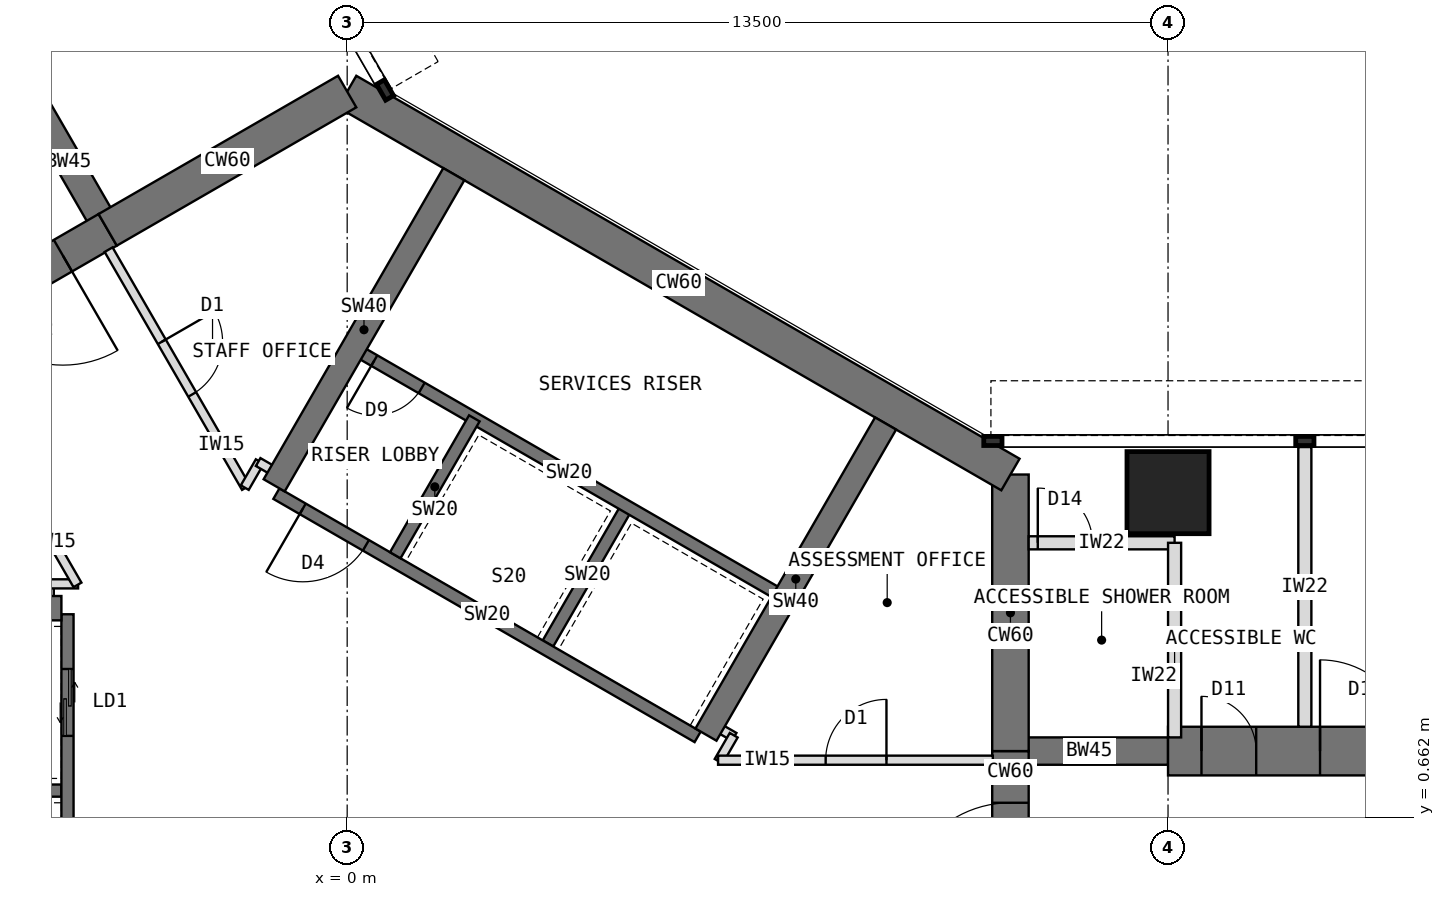
"""IFC4 building model, lengths in metres.
Left out: names, types, materials, properties, quantities, classifications, styles, units other than length and angle.
Written with IfcOpenShell. Run it as: python <this file> out.ifc"""

import sys

from ifc_helpers import new_model, si_unit, direction, frame, frame_2d, origin, origin_2d, place, context, subcontext, project, spatial, rectangle, extrude, element, fill, save


model = new_model("IFC4")
c1 = context("Model", 3, precision=1e-05, world=origin(), true_north=direction((0.0, 1.0)))
c2 = subcontext(c1, "Body", "Model", "MODEL_VIEW")
j1 = project(units=[si_unit("LENGTHUNIT", "METRE"), si_unit("PLANEANGLEUNIT", "RADIAN")], contexts=[c1])
p1 = place(None, origin())
s1 = spatial("IfcSite", under=j1, at=p1, CompositionType="ELEMENT")
p2 = place(p1, origin())
s2 = spatial("IfcBuilding", under=s1, at=p2, CompositionType="ELEMENT")
p3 = place(p2, frame((0.0, 0.0, 101.5)))
s3 = spatial("IfcBuildingStorey", under=s2, at=p3, CompositionType="ELEMENT", Elevation=101.5)
p4 = place(p3, frame((10.908, -1.75, 0.0), z_axis=(0.0, 0.0, 1.0), x_axis=(0.0, 1.0, 0.0)))
e1 = element("IfcWall", 1, at=p4, inside=s3, PredefinedType="SHEAR", context=c2, shape_type="SweptSolid", body=[
    extrude(rectangle(XDim=3.5, YDim=0.6, at=frame_2d((1.75, 0.0))), origin(), (0.0, 0.0, 1.0), 4.0),
])
p5 = place(p4, frame((0.85, 0.0, 0.0)))
e2 = element("IfcOpeningElement", 2, at=p5, cuts=e1, PredefinedType="OPENING", context=c2, shape_type="SweptSolid", body=[
    extrude(rectangle(XDim=1.8, YDim=2.1, at=frame_2d((0.9, 1.05))), frame((0.0, 0.31, 0.0), z_axis=(0.0, -1.0, 0.0), x_axis=(1.0, 0.0, 0.0)), (0.0, 0.0, 1.0), 0.62),
])
p6 = place(p3, frame((10.908, 1.75, 0.0), z_axis=(0.0, 0.0, 1.0), x_axis=(0.0, 1.0, 0.0)))
e3 = element("IfcWall", 3, at=p6, inside=s3, PredefinedType="SHEAR", context=c2, shape_type="SweptSolid", body=[
    extrude(rectangle(XDim=4.548, YDim=0.6, at=frame_2d((2.274, 0.0))), origin(), (0.0, 0.0, 1.0), 4.0),
])
p7 = place(p3, frame((10.908, 6.298, 0.0), z_axis=(0.0, 0.0, 1.0), x_axis=(-0.866021940709, 0.500005998175, 0.0)))
e4 = element("IfcWall", 4, at=p7, inside=s3, PredefinedType="SHEAR", context=c2, shape_type="SweptSolid", body=[
    extrude(rectangle(XDim=12.596, YDim=0.6, at=frame_2d((6.298, 0.0))), origin(), (0.0, 0.0, 1.0), 4.0),
])
p8 = place(p3, frame((0.0, 12.596, 0.0), z_axis=(0.0, 0.0, 1.0), x_axis=(-0.866011268655, -0.500024481964, 0.0)))
e5 = element("IfcWall", 5, at=p8, inside=s3, PredefinedType="SHEAR", context=c2, shape_type="SweptSolid", body=[
    extrude(rectangle(XDim=4.548, YDim=0.6, at=frame_2d((2.274, 0.0))), origin(), (0.0, 0.0, 1.0), 4.0),
])
p9 = place(p3, frame((-3.939, 10.322, 0.0), z_axis=(0.0, 0.0, 1.0), x_axis=(-0.866019471182, -0.500010275428, 0.0)))
e6 = element("IfcWall", 6, at=p9, inside=s3, PredefinedType="SHEAR", context=c2, shape_type="SweptSolid", body=[
    extrude(rectangle(XDim=3.5, YDim=0.6, at=frame_2d((1.75, 0.0))), origin(), (0.0, 0.0, 1.0), 4.0),
])
p10 = place(p9, frame((0.85, 0.0, 0.0)))
e7 = element("IfcOpeningElement", 7, at=p10, cuts=e6, PredefinedType="OPENING", context=c2, shape_type="SweptSolid", body=[
    extrude(rectangle(XDim=1.8, YDim=2.1, at=frame_2d((0.9, 1.05))), frame((0.0, 0.31, 0.0), z_axis=(0.0, -1.0, 0.0), x_axis=(1.0, 0.0, 0.0)), (0.0, 0.0, 1.0), 0.62),
])
p11 = place(p3, frame((10.908, 1.75, 0.0), z_axis=(0.0, 0.0, 1.0), x_axis=(1.0, 0.0, 0.0)))
e8 = element("IfcWall", 8, at=p11, inside=s3, PredefinedType="SHEAR", context=c2, shape_type="SweptSolid", body=[
    extrude(rectangle(XDim=2.592, YDim=0.45, at=frame_2d((1.296, 0.0))), origin(), (0.0, 0.0, 1.0), 4.0),
])
p12 = place(p3, frame((13.5, 1.75, 0.0), z_axis=(0.0, 0.0, 1.0), x_axis=(1.0, 0.0, 0.0)))
e9 = element("IfcWall", 9, at=p12, inside=s3, PredefinedType="SHEAR", context=c2, shape_type="SweptSolid", body=[
    extrude(rectangle(XDim=13.2, YDim=0.8, at=frame_2d((6.6, 0.0))), origin(), (0.0, 0.0, 1.0), 4.0),
])
p13 = place(p12, frame((0.55, 0.0, 0.0)))
e10 = element("IfcOpeningElement", 10, at=p13, cuts=e9, PredefinedType="OPENING", context=c2, shape_type="SweptSolid", body=[
    extrude(rectangle(XDim=0.9, YDim=2.1, at=frame_2d((0.45, 1.05))), frame((0.0, 0.41, 0.0), z_axis=(0.0, -1.0, 0.0), x_axis=(1.0, 0.0, 0.0)), (0.0, 0.0, 1.0), 0.82),
])
p14 = place(p12, frame((2.5, 0.0, 0.0)))
e11 = element("IfcOpeningElement", 11, at=p14, cuts=e9, PredefinedType="OPENING", context=c2, shape_type="SweptSolid", body=[
    extrude(rectangle(XDim=1.5, YDim=2.1, at=frame_2d((0.75, 1.05))), frame((0.0, 0.41, 0.0), z_axis=(0.0, -1.0, 0.0), x_axis=(1.0, 0.0, 0.0)), (0.0, 0.0, 1.0), 0.82),
])
p15 = place(p3, frame((-3.939, 10.322, 0.0), z_axis=(0.0, 0.0, 1.0), x_axis=(-0.499918158782, 0.866072649678, 0.0)))
e12 = element("IfcWall", 12, at=p15, inside=s3, PredefinedType="SHEAR", context=c2, shape_type="SweptSolid", body=[
    extrude(rectangle(XDim=2.592, YDim=0.45, at=frame_2d((1.296, 0.0))), origin(), (0.0, 0.0, 1.0), 4.0),
])
p16 = place(p3, frame((13.5, 6.0, 0.0), z_axis=(0.0, 0.0, 1.0), x_axis=(1.0, 0.0, 0.0)))
e13 = element("IfcColumn", 13, at=p16, inside=s3, PredefinedType="COLUMN", context=c2, shape_type="SweptSolid", body=[
    extrude(rectangle(XDim=1.35, YDim=1.35, at=origin_2d()), origin(), (0.0, 0.0, 1.0), 4.0),
])
p17 = place(p3, frame((5.764, 1.984, 0.0), z_axis=(0.0, 0.0, 1.0), x_axis=(-0.866026010844, 0.49999894854, 0.0)))
e14 = element("IfcWall", 14, at=p17, inside=s3, PredefinedType="SHEAR", context=c2, shape_type="SweptSolid", body=[
    extrude(rectangle(XDim=8.0, YDim=0.2, at=frame_2d((4.0, 0.0))), origin(), (0.0, 0.0, 1.0), 4.0),
])
p18 = place(p17, frame((6.3, 0.0, 0.0)))
e15 = element("IfcOpeningElement", 15, at=p18, cuts=e14, PredefinedType="OPENING", context=c2, shape_type="SweptSolid", body=[
    extrude(rectangle(XDim=1.2, YDim=2.1, at=frame_2d((0.6, 1.05))), frame((0.0, 0.11, 0.0), z_axis=(0.0, -1.0, 0.0), x_axis=(1.0, 0.0, 0.0)), (0.0, 0.0, 1.0), 0.22),
])
for number, where, z_axis, x_axis in (
    (16, (3.303, 3.52, 0.0), (0.0, 0.0, 1.0), (0.5, 0.866, 0.0)),
    (17, (0.791, 4.97, 0.0), (0.0, 0.0, 1.0), (0.5, 0.866, 0.0)),
):
    element("IfcWall", number, at=place(p3, frame(where, z_axis=z_axis, x_axis=x_axis)), inside=s3, PredefinedType="SHEAR", context=c2, shape_type="SweptSolid", body=[
        extrude(rectangle(XDim=2.6, YDim=0.2, at=frame_2d((1.3, 0.0))), origin(), (0.0, 0.0, 1.0), 4.0),
    ])
p19 = place(p3, frame((7.114, 4.322, 0.0), z_axis=(0.0, 0.0, 1.0), x_axis=(-0.866026010844, 0.49999894854, 0.0)))
e18 = element("IfcWall", 18, at=p19, inside=s3, PredefinedType="SHEAR", context=c2, shape_type="SweptSolid", body=[
    extrude(rectangle(XDim=8.0, YDim=0.2, at=frame_2d((4.0, 0.0))), origin(), (0.0, 0.0, 1.0), 4.0),
])
p20 = place(p19, frame((6.8, 0.0, 0.0)))
e19 = element("IfcOpeningElement", 19, at=p20, cuts=e18, PredefinedType="OPENING", context=c2, shape_type="SweptSolid", body=[
    extrude(rectangle(XDim=0.9, YDim=2.1, at=frame_2d((0.45, 1.05))), frame((0.0, 0.11, 0.0), z_axis=(0.0, -1.0, 0.0), x_axis=(1.0, 0.0, 0.0)), (0.0, 0.0, 1.0), 0.22),
])
p21 = place(p3, frame((-1.201, 6.12, 0.0), z_axis=(0.0, 0.0, 1.0), x_axis=(0.49999668571, 0.866027317282, 0.0)))
e20 = element("IfcWall", 20, at=p21, inside=s3, PredefinedType="SHEAR", context=c2, shape_type="SweptSolid", body=[
    extrude(rectangle(XDim=5.908, YDim=0.4, at=frame_2d((2.954, 0.0))), origin(), (0.0, 0.0, 1.0), 4.0),
])
p22 = place(p3, frame((5.901, 2.02, 0.0), z_axis=(0.0, 0.0, 1.0), x_axis=(0.500027676417, 0.866009424208, 0.0)))
e21 = element("IfcWall", 21, at=p22, inside=s3, PredefinedType="SHEAR", context=c2, shape_type="SweptSolid", body=[
    extrude(rectangle(XDim=5.908, YDim=0.4, at=frame_2d((2.954, 0.0))), origin(), (0.0, 0.0, 1.0), 4.0),
])
p23 = place(p3, frame((-4.6, 4.0, 0.0), z_axis=(0.0, 0.0, 1.0), x_axis=(0.0, -1.0, 0.0)))
e22 = element("IfcWall", 22, at=p23, inside=s3, PredefinedType="SHEAR", context=c2, shape_type="SweptSolid", body=[
    extrude(rectangle(XDim=8.0, YDim=0.2, at=frame_2d((4.0, 0.0))), origin(), (0.0, 0.0, 1.0), 4.0),
])
p24 = place(p23, frame((6.3, 0.0, 0.0)))
e23 = element("IfcOpeningElement", 23, at=p24, cuts=e22, PredefinedType="OPENING", context=c2, shape_type="SweptSolid", body=[
    extrude(rectangle(XDim=1.2, YDim=2.1, at=frame_2d((0.6, 1.05))), frame((0.0, 0.11, 0.0), z_axis=(0.0, -1.0, 0.0), x_axis=(1.0, 0.0, 0.0)), (0.0, 0.0, 1.0), 0.22),
])
p25 = place(p23, frame((0.9, 0.0, 0.0)))
e24 = element("IfcOpeningElement", 24, at=p25, cuts=e22, PredefinedType="OPENING", context=c2, shape_type="SweptSolid", body=[
    extrude(rectangle(XDim=1.1, YDim=2.2, at=frame_2d((0.55, 1.1))), frame((0.0, 0.11, 0.0), z_axis=(0.0, -1.0, 0.0), x_axis=(1.0, 0.0, 0.0)), (0.0, 0.0, 1.0), 0.22),
])
p26 = place(p3, frame((-4.7, 1.1, 0.0), z_axis=(0.0, 0.0, 1.0), x_axis=(-1.0, 0.0, 0.0)))
e25 = element("IfcWall", 25, at=p26, inside=s3, PredefinedType="SHEAR", context=c2, shape_type="SweptSolid", body=[
    extrude(rectangle(XDim=2.6, YDim=0.2, at=frame_2d((1.3, 0.0))), origin(), (0.0, 0.0, 1.0), 4.0),
])
p27 = place(p3, frame((-4.7, 4.1, 0.0), z_axis=(0.0, 0.0, 1.0), x_axis=(-1.0, 0.0, 0.0)))
e26 = element("IfcWall", 26, at=p27, inside=s3, PredefinedType="SHEAR", context=c2, shape_type="SweptSolid", body=[
    extrude(rectangle(XDim=5.908, YDim=0.4, at=frame_2d((2.954, 0.0))), origin(), (0.0, 0.0, 1.0), 4.0),
])
p28 = place(p3, frame((15.75, 2.15, 0.0), z_axis=(0.0, 0.0, 1.0), x_axis=(0.0, 1.0, 0.0)))
e27 = element("IfcWall", 27, at=p28, inside=s3, PredefinedType="PARTITIONING", context=c2, shape_type="SweptSolid", body=[
    extrude(rectangle(XDim=4.6, YDim=0.215, at=frame_2d((2.3, 0.0))), origin(), (0.0, 0.0, 1.0), 3.8),
])
p29 = place(p3, frame((11.208, 5.175, 0.0), z_axis=(0.0, 0.0, 1.0), x_axis=(1.0, 0.0, 0.0)))
e28 = element("IfcWall", 28, at=p29, inside=s3, PredefinedType="PARTITIONING", context=c2, shape_type="SweptSolid", body=[
    extrude(rectangle(XDim=2.4, YDim=0.215, at=frame_2d((1.2, 0.0))), origin(), (0.0, 0.0, 1.0), 3.8),
])
p30 = place(p29, frame((0.15, 0.0, 0.0)))
e29 = element("IfcOpeningElement", 29, at=p30, cuts=e28, PredefinedType="OPENING", context=c2, shape_type="SweptSolid", body=[
    extrude(rectangle(XDim=0.9, YDim=2.1, at=frame_2d((0.45, 1.05))), frame((0.0, 0.117, 0.0), z_axis=(0.0, -1.0, 0.0), x_axis=(1.0, 0.0, 0.0)), (0.0, 0.0, 1.0), 0.235),
])
p31 = place(p3, frame((13.608, 1.975, 0.0), z_axis=(0.0, 0.0, 1.0), x_axis=(0.0, 1.0, 0.0)))
e30 = element("IfcWall", 30, at=p31, inside=s3, PredefinedType="PARTITIONING", context=c2, shape_type="SweptSolid", body=[
    extrude(rectangle(XDim=3.2, YDim=0.215, at=frame_2d((1.6, 0.0))), origin(), (0.0, 0.0, 1.0), 3.8),
])
p32 = place(p3, frame((-4.9, 4.09, 0.0), z_axis=(0.0, 0.0, 1.0), x_axis=(0.0, 1.0, 0.0)))
e31 = element("IfcWall", 31, at=p32, inside=s3, PredefinedType="PARTITIONING", context=c2, shape_type="SweptSolid", body=[
    extrude(rectangle(XDim=0.43, YDim=0.15, at=frame_2d((0.215, 0.0))), origin(), (0.0, 0.0, 1.0), 3.8),
])
p33 = place(p3, frame((-4.92, 4.5, 0.0), z_axis=(0.0, 0.0, 1.0), x_axis=(1.0, 0.0, 0.0)))
e32 = element("IfcWall", 32, at=p33, inside=s3, PredefinedType="PARTITIONING", context=c2, shape_type="SweptSolid", body=[
    extrude(rectangle(XDim=0.494, YDim=0.15, at=frame_2d((0.247, 0.0))), origin(), (0.0, 0.0, 1.0), 3.8),
])
p34 = place(p3, frame((-4.436, 4.483, 0.0), z_axis=(0.0, 0.0, 1.0), x_axis=(-0.500009315796, 0.86602002524, 0.0)))
e33 = element("IfcWall", 33, at=p34, inside=s3, PredefinedType="PARTITIONING", context=c2, shape_type="SweptSolid", body=[
    extrude(rectangle(XDim=4.519, YDim=0.15, at=frame_2d((2.259, 0.0))), origin(), (0.0, 0.0, 1.0), 3.8),
])
p35 = place(p34, frame((1.769, 0.0, 0.0)))
e34 = element("IfcOpeningElement", 34, at=p35, cuts=e33, PredefinedType="OPENING", context=c2, shape_type="SweptSolid", body=[
    extrude(rectangle(XDim=1.0, YDim=2.1, at=frame_2d((0.5, 1.05))), frame((0.0, 0.085, 0.0), z_axis=(0.0, -1.0, 0.0), x_axis=(1.0, 0.0, 0.0)), (0.0, 0.0, 1.0), 0.17),
])
p36 = place(p3, frame((-3.924, 9.996, 0.0), z_axis=(0.0, 0.0, 1.0), x_axis=(0.500032713409, -0.866006515865, 0.0)))
e35 = element("IfcWall", 35, at=p36, inside=s3, PredefinedType="PARTITIONING", context=c2, shape_type="SweptSolid", body=[
    extrude(rectangle(XDim=4.518, YDim=0.15, at=frame_2d((2.259, 0.0))), origin(), (0.0, 0.0, 1.0), 3.8),
])
p37 = place(p36, frame((1.749, 0.0, 0.0)))
e36 = element("IfcOpeningElement", 36, at=p37, cuts=e35, PredefinedType="OPENING", context=c2, shape_type="SweptSolid", body=[
    extrude(rectangle(XDim=1.0, YDim=2.1, at=frame_2d((0.5, 1.05))), frame((0.0, 0.085, 0.0), z_axis=(0.0, -1.0, 0.0), x_axis=(1.0, 0.0, 0.0)), (0.0, 0.0, 1.0), 0.17),
])
p38 = place(p3, frame((-1.684, 6.083, 0.0), z_axis=(0.0, 0.0, 1.0), x_axis=(0.50033519877, 0.865831790172, 0.0)))
e37 = element("IfcWall", 37, at=p38, inside=s3, PredefinedType="PARTITIONING", context=c2, shape_type="SweptSolid", body=[
    extrude(rectangle(XDim=0.494, YDim=0.15, at=frame_2d((0.247, 0.0))), origin(), (0.0, 0.0, 1.0), 3.8),
])
for number, where, z_axis, x_axis in (
    (38, (-1.464, 6.503, 0.0), (0.0, 0.0, 1.0), (0.866, -0.5, 0.0)),
    (39, (5.992, 2.198, 0.0), (0.0, 0.0, 1.0), (0.866, -0.5, 0.0)),
):
    element("IfcWall", number, at=place(p3, frame(where, z_axis=z_axis, x_axis=x_axis)), inside=s3, PredefinedType="PARTITIONING", context=c2, shape_type="SweptSolid", body=[
        extrude(rectangle(XDim=0.43, YDim=0.15, at=frame_2d((0.215, 0.0))), origin(), (0.0, 0.0, 1.0), 3.8),
    ])
p39 = place(p3, frame((6.357, 2.011, 0.0), z_axis=(0.0, 0.0, 1.0), x_axis=(-0.50033519877, -0.865831790172, 0.0)))
e40 = element("IfcWall", 40, at=p39, inside=s3, PredefinedType="PARTITIONING", context=c2, shape_type="SweptSolid", body=[
    extrude(rectangle(XDim=0.494, YDim=0.15, at=frame_2d((0.247, 0.0))), origin(), (0.0, 0.0, 1.0), 3.8),
])
p40 = place(p3, frame((6.1, 1.6, 0.0), z_axis=(0.0, 0.0, 1.0), x_axis=(1.0, 0.0, 0.0)))
e41 = element("IfcWall", 41, at=p40, inside=s3, PredefinedType="PARTITIONING", context=c2, shape_type="SweptSolid", body=[
    extrude(rectangle(XDim=4.519, YDim=0.15, at=frame_2d((2.259, 0.0))), origin(), (0.0, 0.0, 1.0), 3.8),
])
p41 = place(p40, frame((1.769, 0.0, 0.0)))
e42 = element("IfcOpeningElement", 42, at=p41, cuts=e41, PredefinedType="OPENING", context=c2, shape_type="SweptSolid", body=[
    extrude(rectangle(XDim=1.0, YDim=2.1, at=frame_2d((0.5, 1.05))), frame((0.0, 0.085, 0.0), z_axis=(0.0, -1.0, 0.0), x_axis=(1.0, 0.0, 0.0)), (0.0, 0.0, 1.0), 0.17),
])
p42 = place(p18, origin())
e43 = element("IfcDoor", 43, at=p42, inside=s3, OperationType="SINGLE_SWING_RIGHT", PredefinedType="DOOR", context=c2, shape_type="SweptSolid", body=[
    extrude(rectangle(XDim=1.2, YDim=2.1, at=frame_2d((0.6, 1.05))), frame((0.0, 0.025, 0.0), z_axis=(0.0, -1.0, 0.0), x_axis=(1.0, 0.0, 0.0)), (0.0, 0.0, 1.0), 0.05),
])
fill(e15, e43)
p43 = place(p20, origin())
e44 = element("IfcDoor", 44, at=p43, inside=s3, OperationType="SINGLE_SWING_RIGHT", PredefinedType="DOOR", context=c2, shape_type="SweptSolid", body=[
    extrude(rectangle(XDim=0.9, YDim=2.1, at=frame_2d((0.45, 1.05))), frame((0.0, 0.025, 0.0), z_axis=(0.0, -1.0, 0.0), x_axis=(1.0, 0.0, 0.0)), (0.0, 0.0, 1.0), 0.05),
])
fill(e19, e44)
p44 = place(p25, origin())
e45 = element("IfcDoor", 45, at=p44, inside=s3, OperationType="DOUBLE_DOOR_SLIDING", PredefinedType="DOOR", context=c2, shape_type="SweptSolid", body=[
    extrude(rectangle(XDim=1.1, YDim=2.2, at=frame_2d((0.55, 1.1))), frame((0.0, 0.025, 0.0), z_axis=(0.0, -1.0, 0.0), x_axis=(1.0, 0.0, 0.0)), (0.0, 0.0, 1.0), 0.05),
])
fill(e24, e45)
p45 = place(p5, origin())
e46 = element("IfcDoor", 46, at=p45, inside=s3, OperationType="DOUBLE_DOOR_DOUBLE_SWING", PredefinedType="DOOR", context=c2, shape_type="SweptSolid", body=[
    extrude(rectangle(XDim=1.72, YDim=2.06, at=frame_2d((0.9, 1.03))), frame((0.0, 0.025, 0.0), z_axis=(0.0, -1.0, 0.0), x_axis=(1.0, 0.0, 0.0)), (0.0, 0.0, 1.0), 0.05),
    extrude(rectangle(XDim=0.04, YDim=2.1, at=frame_2d((0.02, 1.05))), frame((0.0, 0.3, 0.0), z_axis=(0.0, -1.0, 0.0), x_axis=(1.0, 0.0, 0.0)), (0.0, 0.0, 1.0), 0.6),
    extrude(rectangle(XDim=0.04, YDim=2.1, at=frame_2d((1.78, 1.05))), frame((0.0, 0.3, 0.0), z_axis=(0.0, -1.0, 0.0), x_axis=(1.0, 0.0, 0.0)), (0.0, 0.0, 1.0), 0.6),
    extrude(rectangle(XDim=1.72, YDim=0.04, at=frame_2d((0.9, 2.08))), frame((0.0, 0.3, 0.0), z_axis=(0.0, -1.0, 0.0), x_axis=(1.0, 0.0, 0.0)), (0.0, 0.0, 1.0), 0.6),
])
fill(e2, e46)
p46 = place(p10, origin())
e47 = element("IfcDoor", 47, at=p46, inside=s3, OperationType="DOUBLE_DOOR_DOUBLE_SWING", PredefinedType="DOOR", context=c2, shape_type="SweptSolid", body=[
    extrude(rectangle(XDim=1.72, YDim=2.06, at=frame_2d((0.9, 1.03))), frame((0.0, 0.025, 0.0), z_axis=(0.0, -1.0, 0.0), x_axis=(1.0, 0.0, 0.0)), (0.0, 0.0, 1.0), 0.05),
    extrude(rectangle(XDim=0.04, YDim=2.1, at=frame_2d((0.02, 1.05))), frame((0.0, 0.3, 0.0), z_axis=(0.0, -1.0, 0.0), x_axis=(1.0, 0.0, 0.0)), (0.0, 0.0, 1.0), 0.6),
    extrude(rectangle(XDim=0.04, YDim=2.1, at=frame_2d((1.78, 1.05))), frame((0.0, 0.3, 0.0), z_axis=(0.0, -1.0, 0.0), x_axis=(1.0, 0.0, 0.0)), (0.0, 0.0, 1.0), 0.6),
    extrude(rectangle(XDim=1.72, YDim=0.04, at=frame_2d((0.9, 2.08))), frame((0.0, 0.3, 0.0), z_axis=(0.0, -1.0, 0.0), x_axis=(1.0, 0.0, 0.0)), (0.0, 0.0, 1.0), 0.6),
])
fill(e7, e47)
p47 = place(p30, origin())
e48 = element("IfcDoor", 48, at=p47, inside=s3, OperationType="SINGLE_SWING_LEFT", PredefinedType="DOOR", context=c2, shape_type="SweptSolid", body=[
    extrude(rectangle(XDim=0.9, YDim=2.1, at=frame_2d((0.45, 1.05))), frame((0.0, 0.025, 0.0), z_axis=(0.0, -1.0, 0.0), x_axis=(1.0, 0.0, 0.0)), (0.0, 0.0, 1.0), 0.05),
])
fill(e29, e48)
p48 = place(p41, origin())
e49 = element("IfcDoor", 49, at=p48, inside=s3, OperationType="SINGLE_SWING_RIGHT", PredefinedType="DOOR", context=c2, shape_type="SweptSolid", body=[
    extrude(rectangle(XDim=1.0, YDim=2.1, at=frame_2d((0.5, 1.05))), frame((0.0, 0.025, 0.0), z_axis=(0.0, -1.0, 0.0), x_axis=(1.0, 0.0, 0.0)), (0.0, 0.0, 1.0), 0.05),
])
fill(e42, e49)
p49 = place(p37, origin())
e50 = element("IfcDoor", 50, at=p49, inside=s3, OperationType="SINGLE_SWING_LEFT", PredefinedType="DOOR", context=c2, shape_type="SweptSolid", body=[
    extrude(rectangle(XDim=1.0, YDim=2.1, at=frame_2d((0.5, 1.05))), frame((0.0, 0.025, 0.0), z_axis=(0.0, -1.0, 0.0), x_axis=(1.0, 0.0, 0.0)), (0.0, 0.0, 1.0), 0.05),
])
fill(e36, e50)
p50 = place(p13, origin())
e51 = element("IfcDoor", 51, at=p50, inside=s3, OperationType="SINGLE_SWING_LEFT", PredefinedType="DOOR", context=c2, shape_type="SweptSolid", body=[
    extrude(rectangle(XDim=0.82, YDim=2.06, at=frame_2d((0.45, 1.03))), frame((0.0, 0.025, 0.0), z_axis=(0.0, -1.0, 0.0), x_axis=(1.0, 0.0, 0.0)), (0.0, 0.0, 1.0), 0.05),
    extrude(rectangle(XDim=0.04, YDim=2.1, at=frame_2d((0.02, 1.05))), frame((0.0, 0.4, 0.0), z_axis=(0.0, -1.0, 0.0), x_axis=(1.0, 0.0, 0.0)), (0.0, 0.0, 1.0), 0.8),
    extrude(rectangle(XDim=0.04, YDim=2.1, at=frame_2d((0.88, 1.05))), frame((0.0, 0.4, 0.0), z_axis=(0.0, -1.0, 0.0), x_axis=(1.0, 0.0, 0.0)), (0.0, 0.0, 1.0), 0.8),
    extrude(rectangle(XDim=0.82, YDim=0.04, at=frame_2d((0.45, 2.08))), frame((0.0, 0.4, 0.0), z_axis=(0.0, -1.0, 0.0), x_axis=(1.0, 0.0, 0.0)), (0.0, 0.0, 1.0), 0.8),
])
fill(e10, e51)
p51 = place(p14, origin())
e52 = element("IfcDoor", 52, at=p51, inside=s3, OperationType="DOUBLE_DOOR_SINGLE_SWING", PredefinedType="DOOR", context=c2, shape_type="SweptSolid", body=[
    extrude(rectangle(XDim=1.42, YDim=2.06, at=frame_2d((0.75, 1.03))), frame((0.0, 0.025, 0.0), z_axis=(0.0, -1.0, 0.0), x_axis=(1.0, 0.0, 0.0)), (0.0, 0.0, 1.0), 0.05),
    extrude(rectangle(XDim=0.04, YDim=2.1, at=frame_2d((0.02, 1.05))), frame((0.0, 0.4, 0.0), z_axis=(0.0, -1.0, 0.0), x_axis=(1.0, 0.0, 0.0)), (0.0, 0.0, 1.0), 0.8),
    extrude(rectangle(XDim=0.04, YDim=2.1, at=frame_2d((1.48, 1.05))), frame((0.0, 0.4, 0.0), z_axis=(0.0, -1.0, 0.0), x_axis=(1.0, 0.0, 0.0)), (0.0, 0.0, 1.0), 0.8),
    extrude(rectangle(XDim=1.42, YDim=0.04, at=frame_2d((0.75, 2.08))), frame((0.0, 0.4, 0.0), z_axis=(0.0, -1.0, 0.0), x_axis=(1.0, 0.0, 0.0)), (0.0, 0.0, 1.0), 0.8),
])
fill(e11, e52)
save(model, sys.argv[1])
